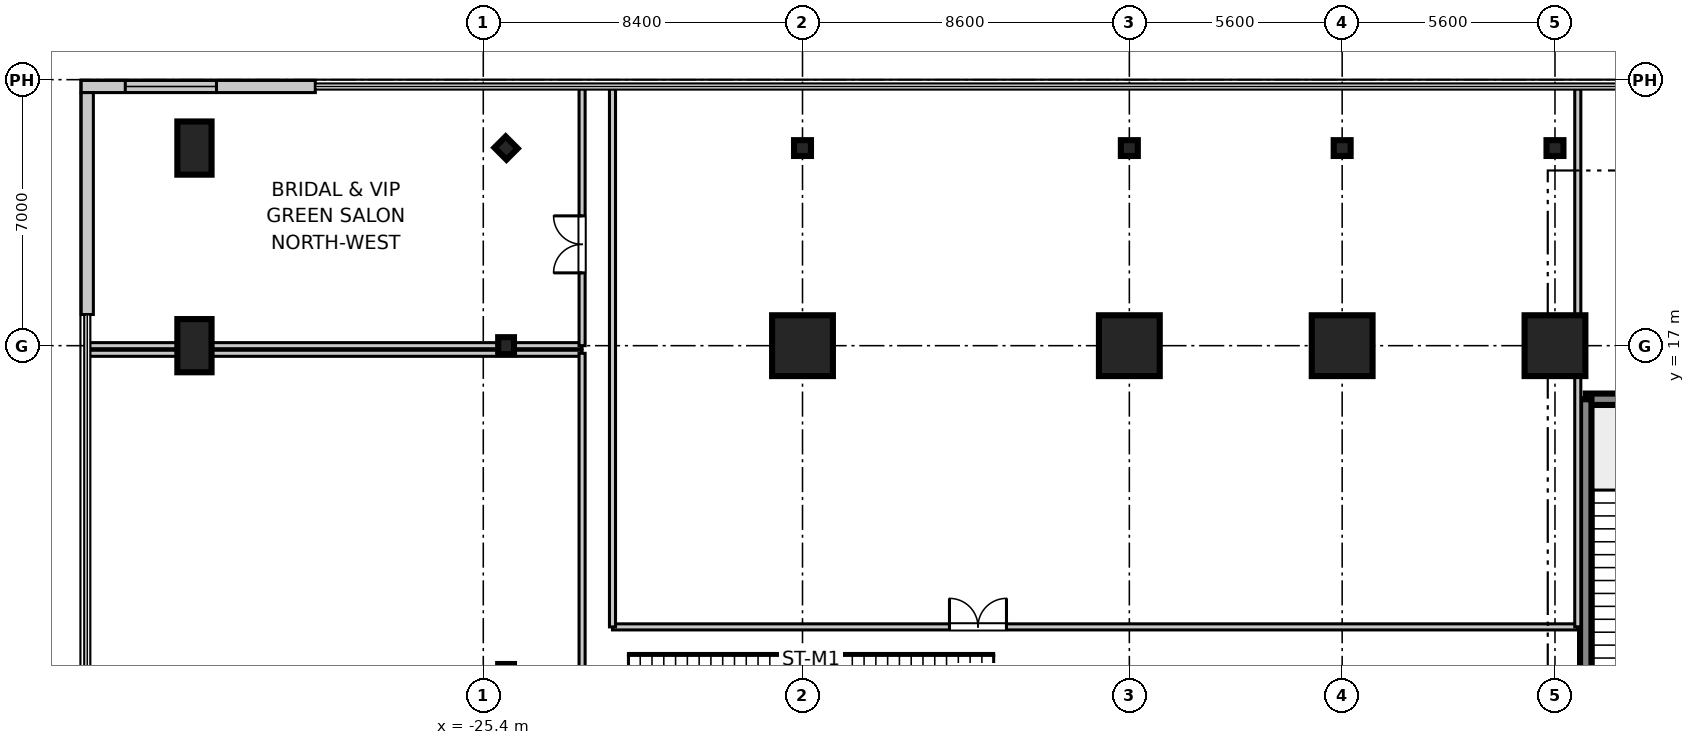
"""IFC4 building model, lengths in metres.
Left out: names, types, materials, properties, quantities, classifications, styles, units other than length and angle.
Written with IfcOpenShell. Run it as: python <this file> out.ifc"""

import sys

from ifc_helpers import new_model, si_unit, direction, frame, frame_2d, origin, origin_2d, place, context, subcontext, project, spatial, rectangle, i_section, extrude, source, transform, mapped, element, fill, save


model = new_model("IFC4")
c1 = context("Model", 3, precision=1e-05, world=origin(), true_north=direction((0.0, 1.0)))
c2 = subcontext(c1, "Body", "Model", "MODEL_VIEW")
j1 = project(units=[si_unit("LENGTHUNIT", "METRE"), si_unit("PLANEANGLEUNIT", "RADIAN")], contexts=[c1])
p1 = place(None, origin())
s1 = spatial("IfcSite", under=j1, at=p1, CompositionType="ELEMENT")
p2 = place(p1, origin())
s2 = spatial("IfcBuilding", under=s1, at=p2, CompositionType="ELEMENT")
p3 = place(p2, frame((0.0, 0.0, 16.2)))
s3 = spatial("IfcBuildingStorey", under=s2, at=p3, CompositionType="ELEMENT", Elevation=16.2)
m1 = source(origin(), c2, "Body", "SweptSolid", [
    extrude(rectangle(XDim=1.6, YDim=1.6, at=origin_2d()), origin(), (0.0, 0.0, 1.0), 5.355),
])
for number, where, z_axis, x_axis in (
    (1, (-17.0, 17.0, 0.0), (0.0, 0.0, 1.0), (1.0, 0.0, 0.0)),
    (2, (-8.4, 17.0, 0.0), (0.0, 0.0, 1.0), (1.0, 0.0, 0.0)),
    (3, (-2.8, 17.0, 0.0), (0.0, 0.0, 1.0), (1.0, 0.0, 0.0)),
    (4, (2.8, 17.0, 0.0), (0.0, 0.0, 1.0), (1.0, 0.0, 0.0)),
):
    element("IfcColumn", number, at=place(p3, frame(where, z_axis=z_axis, x_axis=x_axis)), inside=s3, PredefinedType="COLUMN", context=c2, shape_type="MappedRepresentation", body=[
        mapped(m1, transform((0.0, 0.0, 0.0), scale=1.0)),
    ])
m2 = source(origin(), c2, "Body", "SweptSolid", [
    extrude(rectangle(XDim=0.9, YDim=1.4, at=origin_2d()), origin(), (0.0, 0.0, 1.0), 5.355),
])
for number, where, z_axis, x_axis in (
    (5, (-33.0, 17.0, 0.0), (0.0, 0.0, 1.0), (1.0, 0.0, 0.0)),
    (6, (-33.0, 22.2, 0.0), (0.0, 0.0, 1.0), (1.0, 0.0, 0.0)),
):
    element("IfcColumn", number, at=place(p3, frame(where, z_axis=z_axis, x_axis=x_axis)), inside=s3, PredefinedType="PILASTER", context=c2, shape_type="MappedRepresentation", body=[
        mapped(m2, transform((0.0, 0.0, 0.0), scale=1.0)),
    ])
m3 = source(origin(), c2, "Body", "SweptSolid", [
    extrude(i_section(OverallWidth=0.416, OverallDepth=0.446, WebThickness=0.025, FlangeThickness=0.04, at=origin_2d()), origin(), (0.0, 0.0, 1.0), 5.355),
])
for number, where, z_axis, x_axis in (
    (7, (-24.8, 8.4, 0.0), (0.0, 0.0, 1.0), (1.0, 0.0, 0.0)),
    (8, (-24.8, 17.0, 0.0), (0.0, 0.0, 1.0), (1.0, 0.0, 0.0)),
    (9, (-17.0, 22.2, 0.0), (0.0, 0.0, 1.0), (0.0, 1.0, 0.0)),
    (10, (-8.4, 22.2, 0.0), (0.0, 0.0, 1.0), (0.0, 1.0, 0.0)),
    (11, (-2.8, 22.2, 0.0), (0.0, 0.0, 1.0), (0.0, 1.0, 0.0)),
    (12, (2.8, 22.2, 0.0), (0.0, 0.0, 1.0), (0.0, 1.0, 0.0)),
    (13, (-24.8, 22.2, 0.0), (0.0, 0.0, 1.0), (0.707, 0.707, 0.0)),
):
    element("IfcColumn", number, at=place(p3, frame(where, z_axis=z_axis, x_axis=x_axis)), inside=s3, PredefinedType="COLUMN", context=c2, shape_type="MappedRepresentation", body=[
        mapped(m3, transform((0.0, 0.0, 0.0), scale=1.0)),
    ])
m4 = source(origin(), c2, "Body", "SweptSolid", [
    extrude(rectangle(XDim=3.98, YDim=0.3, at=frame_2d((1.99, 0.0))), origin(), (0.0, 0.0, 1.0), 5.08),
])
p4 = place(p3, frame((3.61, 15.59, 0.0), z_axis=(0.0, 0.0, 1.0), x_axis=(1.0, 0.0, 0.0)))
e14 = element("IfcWall", 14, at=p4, inside=s3, PredefinedType="SHEAR", context=c2, shape_type="MappedRepresentation", body=[
    mapped(m4, transform((0.0, 0.0, 0.0), scale=1.0)),
])
m5 = source(origin(), c2, "Body", "SweptSolid", [
    extrude(rectangle(XDim=9.38, YDim=0.3, at=frame_2d((4.69, 0.0))), origin(), (0.0, 0.0, 1.0), 5.08),
])
p5 = place(p3, frame((3.61, 6.21, 0.0), z_axis=(0.0, 0.0, 1.0), x_axis=(0.0, 1.0, 0.0)))
e15 = element("IfcWall", 15, at=p5, inside=s3, PredefinedType="SHEAR", context=c2, shape_type="MappedRepresentation", body=[
    mapped(m5, transform((0.0, 0.0, 0.0), scale=1.0)),
])
m6 = source(origin(), c2, "Body", "SweptSolid", [
    extrude(rectangle(XDim=6.16, YDim=0.32, at=frame_2d((3.08, 0.0))), origin(), (0.0, 0.0, 1.0), 5.08),
])
p6 = place(p3, frame((-35.98, 23.82, 0.0), z_axis=(0.0, 0.0, 1.0), x_axis=(1.0, 0.0, 0.0)))
e16 = element("IfcWall", 16, at=p6, inside=s3, PredefinedType="STANDARD", context=c2, shape_type="MappedRepresentation", body=[
    mapped(m6, transform((0.0, 0.0, 0.0), scale=1.0)),
])
p7 = place(p6, frame((1.16, 0.0, 0.9)))
e17 = element("IfcOpeningElement", 17, at=p7, cuts=e16, PredefinedType="OPENING", context=c2, shape_type="SweptSolid", body=[
    extrude(rectangle(XDim=2.4, YDim=2.2, at=frame_2d((1.2, 1.1))), frame((0.0, 0.17, 0.0), z_axis=(0.0, -1.0, 0.0), x_axis=(1.0, 0.0, 0.0)), (0.0, 0.0, 1.0), 0.34),
])
m7 = source(origin(), c2, "Body", "SweptSolid", [
    extrude(rectangle(XDim=5.84, YDim=0.32, at=frame_2d((2.92, 0.0))), origin(), (0.0, 0.0, 1.0), 5.08),
])
p8 = place(p3, frame((-35.82, 17.82, 0.0), z_axis=(0.0, 0.0, 1.0), x_axis=(0.0, 1.0, 0.0)))
e18 = element("IfcWall", 18, at=p8, inside=s3, PredefinedType="STANDARD", context=c2, shape_type="MappedRepresentation", body=[
    mapped(m7, transform((0.0, 0.0, 0.0), scale=1.0)),
])
m8 = source(origin(), c2, "Body", "SweptSolid", [
    extrude(rectangle(XDim=12.96, YDim=0.16, at=frame_2d((6.48, 0.0))), origin(), (0.0, 0.0, 1.0), 3.4),
])
p9 = place(p3, frame((-35.76, 16.8, 0.0), z_axis=(0.0, 0.0, 1.0), x_axis=(1.0, 0.0, 0.0)))
e19 = element("IfcWall", 19, at=p9, inside=s3, PredefinedType="PARTITIONING", context=c2, shape_type="MappedRepresentation", body=[
    mapped(m8, transform((0.0, 0.0, 0.0), scale=1.0)),
])
m9 = source(origin(), c2, "Body", "SweptSolid", [
    extrude(rectangle(XDim=33.6, YDim=0.16, at=frame_2d((16.8, 0.0))), origin(), (0.0, 0.0, 1.0), 3.4),
])
p10 = place(p3, frame((-22.8, -16.8, 0.0), z_axis=(0.0, 0.0, 1.0), x_axis=(0.0, 1.0, 0.0)))
e20 = element("IfcWall", 20, at=p10, inside=s3, PredefinedType="PARTITIONING", context=c2, shape_type="MappedRepresentation", body=[
    mapped(m9, transform((0.0, 0.0, 0.0), scale=1.0)),
])
p11 = place(p10, frame((16.05, 0.0, 0.0)))
e21 = element("IfcOpeningElement", 21, at=p11, cuts=e20, PredefinedType="OPENING", context=c2, shape_type="SweptSolid", body=[
    extrude(rectangle(XDim=1.5, YDim=2.15, at=frame_2d((0.75, 1.075))), frame((0.0, 0.09, 0.0), z_axis=(0.0, -1.0, 0.0), x_axis=(1.0, 0.0, 0.0)), (0.0, 0.0, 1.0), 0.18),
])
p12 = place(p3, frame((-35.76, 17.0, 0.0), z_axis=(0.0, 0.0, 1.0), x_axis=(1.0, 0.0, 0.0)))
e22 = element("IfcWall", 22, at=p12, inside=s3, PredefinedType="PARTITIONING", context=c2, shape_type="MappedRepresentation", body=[
    mapped(m8, transform((0.0, 0.0, 0.0), scale=1.0)),
])
m10 = source(origin(), c2, "Body", "SweptSolid", [
    extrude(rectangle(XDim=6.76, YDim=0.16, at=frame_2d((3.38, 0.0))), origin(), (0.0, 0.0, 1.0), 3.4),
])
p13 = place(p3, frame((-22.8, 17.0, 0.0), z_axis=(0.0, 0.0, 1.0), x_axis=(0.0, 1.0, 0.0)))
e23 = element("IfcWall", 23, at=p13, inside=s3, PredefinedType="PARTITIONING", context=c2, shape_type="MappedRepresentation", body=[
    mapped(m10, transform((0.0, 0.0, 0.0), scale=1.0)),
])
p14 = place(p13, frame((1.916, 0.0, 0.0)))
e24 = element("IfcOpeningElement", 24, at=p14, cuts=e23, PredefinedType="OPENING", context=c2, shape_type="SweptSolid", body=[
    extrude(rectangle(XDim=1.5, YDim=2.15, at=frame_2d((0.75, 1.075))), frame((0.0, 0.09, 0.0), z_axis=(0.0, -1.0, 0.0), x_axis=(1.0, 0.0, 0.0)), (0.0, 0.0, 1.0), 0.18),
])
m11 = source(origin(), c2, "Body", "SweptSolid", [
    extrude(rectangle(XDim=25.4, YDim=0.16, at=frame_2d((12.7, 0.0))), origin(), (0.0, 0.0, 1.0), 3.4),
])
p15 = place(p3, frame((-22.0, 9.6, 0.0), z_axis=(0.0, 0.0, 1.0), x_axis=(1.0, 0.0, 0.0)))
e25 = element("IfcWall", 25, at=p15, inside=s3, PredefinedType="PARTITIONING", context=c2, shape_type="MappedRepresentation", body=[
    mapped(m11, transform((0.0, 0.0, 0.0), scale=1.0)),
])
p16 = place(p15, frame((8.867, 0.0, 0.0)))
e26 = element("IfcOpeningElement", 26, at=p16, cuts=e25, PredefinedType="OPENING", context=c2, shape_type="SweptSolid", body=[
    extrude(rectangle(XDim=1.5, YDim=2.15, at=frame_2d((0.75, 1.075))), frame((0.0, 0.09, 0.0), z_axis=(0.0, -1.0, 0.0), x_axis=(1.0, 0.0, 0.0)), (0.0, 0.0, 1.0), 0.18),
])
m12 = source(origin(), c2, "Body", "SweptSolid", [
    extrude(rectangle(XDim=14.16, YDim=0.16, at=frame_2d((7.08, 0.0))), origin(), (0.0, 0.0, 1.0), 3.4),
])
for number, where, z_axis, x_axis in (
    (27, (-22.0, 9.6, 0.0), (0.0, 0.0, 1.0), (0.0, 1.0, 0.0)),
    (28, (3.4, 9.6, 0.0), (0.0, 0.0, 1.0), (0.0, 1.0, 0.0)),
):
    element("IfcWall", number, at=place(p3, frame(where, z_axis=z_axis, x_axis=x_axis)), inside=s3, PredefinedType="PARTITIONING", context=c2, shape_type="MappedRepresentation", body=[
        mapped(m12, transform((0.0, 0.0, 0.0), scale=1.0)),
    ])
m13 = source(origin(), c2, "Body", "SweptSolid", [
    extrude(rectangle(XDim=2.4, YDim=2.2, at=frame_2d((1.2, 1.1))), frame((0.0, 0.03, 0.0), z_axis=(0.0, -1.0, 0.0), x_axis=(1.0, 0.0, 0.0)), (0.0, 0.0, 1.0), 0.06),
])
p17 = place(p7, origin())
e29 = element("IfcWindow", 29, at=p17, inside=s3, PartitioningType="SINGLE_PANEL", PredefinedType="WINDOW", context=c2, shape_type="MappedRepresentation", body=[
    mapped(m13, transform((0.0, 0.0, 0.0), scale=1.0)),
])
fill(e17, e29)
m14 = source(origin(), c2, "Body", "SweptSolid", [
    extrude(rectangle(XDim=1.5, YDim=2.15, at=frame_2d((0.75, 1.075))), frame((0.0, 0.025, 0.0), z_axis=(0.0, -1.0, 0.0), x_axis=(1.0, 0.0, 0.0)), (0.0, 0.0, 1.0), 0.05),
])
p18 = place(p14, origin())
e30 = element("IfcDoor", 30, at=p18, inside=s3, OperationType="DOUBLE_DOOR_SINGLE_SWING", PredefinedType="DOOR", context=c2, shape_type="MappedRepresentation", body=[
    mapped(m14, transform((0.0, 0.0, 0.0), scale=1.0)),
])
fill(e24, e30)
p19 = place(p16, origin())
e31 = element("IfcDoor", 31, at=p19, inside=s3, OperationType="DOUBLE_DOOR_SINGLE_SWING", PredefinedType="DOOR", context=c2, shape_type="MappedRepresentation", body=[
    mapped(m14, transform((0.0, 0.0, 0.0), scale=1.0)),
])
fill(e26, e31)
save(model, sys.argv[1])
